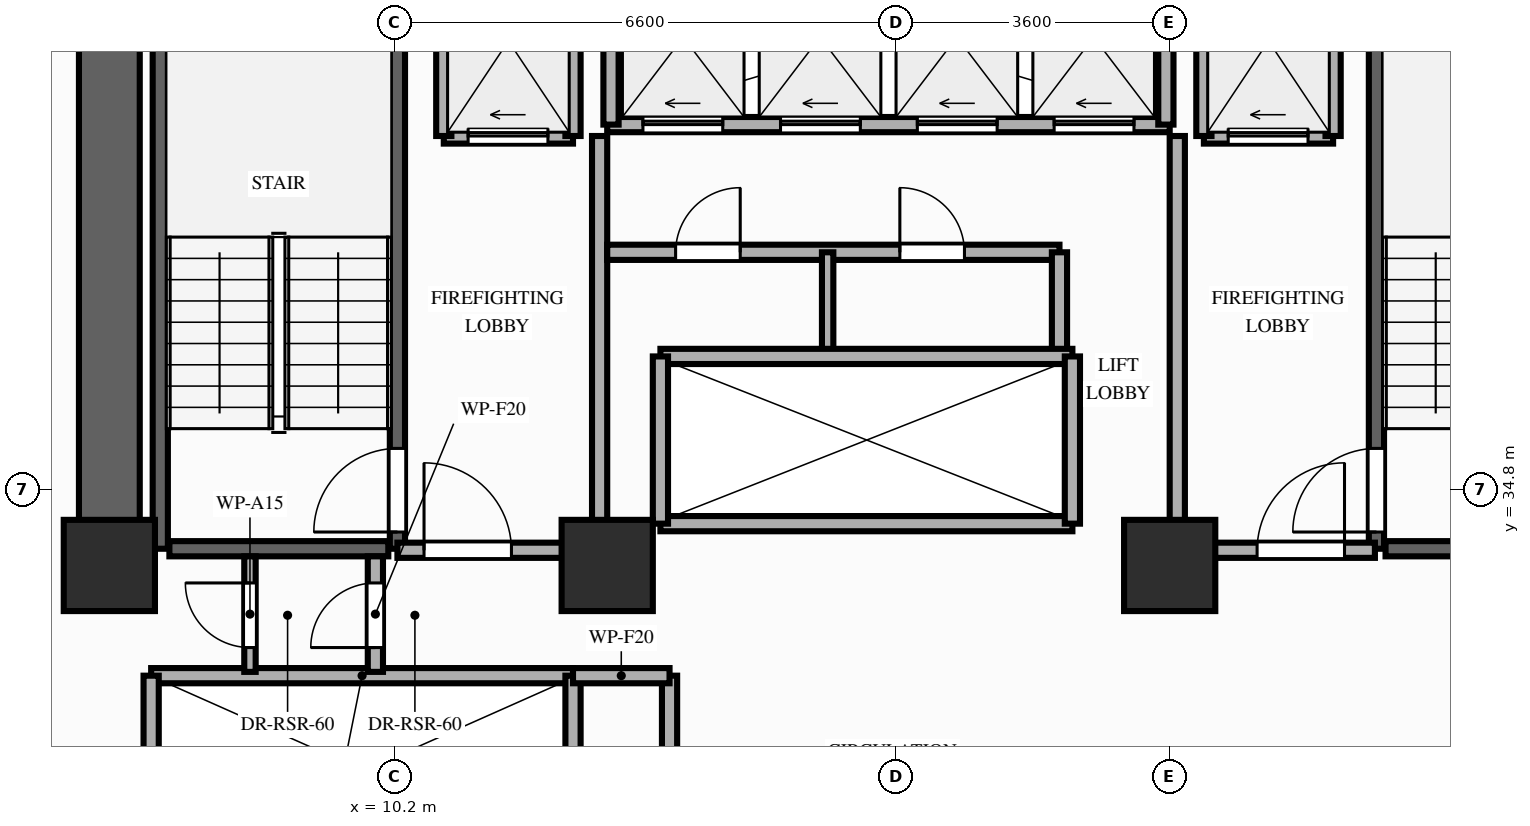
"""IFC4 building model, lengths in metres.
Left out: names, types, materials, properties, quantities, classifications, styles, units other than length and angle.
Written with IfcOpenShell. Run it as: python <this file> out.ifc"""

import sys

from ifc_helpers import new_model, si_unit, direction, frame, frame_2d, origin, origin_2d, place, context, subcontext, project, spatial, rectangle, extrude, element, fill, save


model = new_model("IFC4")
c1 = context("Model", 3, precision=1e-05, world=origin(), true_north=direction((0.0, 1.0)))
c2 = subcontext(c1, "Body", "Model", "MODEL_VIEW")
j1 = project(units=[si_unit("LENGTHUNIT", "METRE"), si_unit("PLANEANGLEUNIT", "RADIAN")], contexts=[c1])
p1 = place(None, origin())
s1 = spatial("IfcSite", under=j1, at=p1, CompositionType="ELEMENT")
p2 = place(p1, origin())
s2 = spatial("IfcBuilding", under=s1, at=p2, CompositionType="ELEMENT")
p3 = place(p2, frame((0.0, 0.0, 62.8)))
s3 = spatial("IfcBuildingStorey", under=s2, at=p3, CompositionType="ELEMENT", Elevation=62.8)
for number, where, z_axis, x_axis in (
    (1, (6.45, 33.8, 0.0), (0.0, 0.0, 1.0), (1.0, 0.0, 0.0)),
    (2, (13.0, 33.8, 0.0), (0.0, 0.0, 1.0), (1.0, 0.0, 0.0)),
    (3, (20.4, 33.8, 0.0), (0.0, 0.0, 1.0), (1.0, 0.0, 0.0)),
):
    element("IfcColumn", number, at=place(p3, frame(where, z_axis=z_axis, x_axis=x_axis)), inside=s3, PredefinedType="COLUMN", context=c2, shape_type="SweptSolid", body=[
        extrude(rectangle(XDim=1.2, YDim=1.2, at=origin_2d()), origin(), (0.0, 0.0, 1.0), 3.2),
    ])
p4 = place(p3, frame((6.45, 33.8, 0.0), z_axis=(0.0, 0.0, 1.0), x_axis=(0.0, 1.0, 0.0)))
e4 = element("IfcWall", 4, at=p4, inside=s3, PredefinedType="SHEAR", context=c2, shape_type="SweptSolid", body=[
    extrude(rectangle(XDim=7.95, YDim=0.8, at=frame_2d((3.975, 0.0))), origin(), (0.0, 0.0, 1.0), 3.02),
])
p5 = place(p3, frame((7.12, 34.02, 0.0), z_axis=(0.0, 0.0, 1.0), x_axis=(0.0, 1.0, 0.0)))
e5 = element("IfcWall", 5, at=p5, inside=s3, PredefinedType="SHEAR", context=c2, shape_type="SweptSolid", body=[
    extrude(rectangle(XDim=7.78, YDim=0.2, at=frame_2d((3.89, 0.0))), origin(), (0.0, 0.0, 1.0), 3.02),
])
p6 = place(p3, frame((10.24, 34.02, 0.0), z_axis=(0.0, 0.0, 1.0), x_axis=(0.0, 1.0, 0.0)))
e6 = element("IfcWall", 6, at=p6, inside=s3, PredefinedType="SHEAR", context=c2, shape_type="SweptSolid", body=[
    extrude(rectangle(XDim=7.78, YDim=0.2, at=frame_2d((3.89, 0.0))), origin(), (0.0, 0.0, 1.0), 3.02),
])
p7 = place(p6, frame((0.22, 0.0, 0.0)))
e7 = element("IfcOpeningElement", 7, at=p7, cuts=e6, PredefinedType="OPENING", context=c2, shape_type="SweptSolid", body=[
    extrude(rectangle(XDim=1.1, YDim=2.15, at=frame_2d((0.55, 1.075))), frame((0.0, 0.11, 0.0), z_axis=(0.0, -1.0, 0.0), x_axis=(1.0, 0.0, 0.0)), (0.0, 0.0, 1.0), 0.22),
])
p8 = place(p3, frame((7.24, 34.02, 0.0), z_axis=(0.0, 0.0, 1.0), x_axis=(1.0, 0.0, 0.0)))
e8 = element("IfcWall", 8, at=p8, inside=s3, PredefinedType="SHEAR", context=c2, shape_type="SweptSolid", body=[
    extrude(rectangle(XDim=2.88, YDim=0.2, at=frame_2d((1.44, 0.0))), origin(), (0.0, 0.0, 1.0), 3.02),
])
p9 = place(p3, frame((23.12, 34.02, 0.0), z_axis=(0.0, 0.0, 1.0), x_axis=(0.0, 1.0, 0.0)))
e9 = element("IfcWall", 9, at=p9, inside=s3, PredefinedType="SHEAR", context=c2, shape_type="SweptSolid", body=[
    extrude(rectangle(XDim=7.78, YDim=0.2, at=frame_2d((3.89, 0.0))), origin(), (0.0, 0.0, 1.0), 3.02),
])
p10 = place(p9, frame((0.22, 0.0, 0.0)))
e10 = element("IfcOpeningElement", 10, at=p10, cuts=e9, PredefinedType="OPENING", context=c2, shape_type="SweptSolid", body=[
    extrude(rectangle(XDim=1.1, YDim=2.15, at=frame_2d((0.55, 1.075))), frame((0.0, 0.11, 0.0), z_axis=(0.0, -1.0, 0.0), x_axis=(1.0, 0.0, 0.0)), (0.0, 0.0, 1.0), 0.22),
])
p11 = place(p3, frame((23.24, 34.02, 0.0), z_axis=(0.0, 0.0, 1.0), x_axis=(1.0, 0.0, 0.0)))
e11 = element("IfcWall", 11, at=p11, inside=s3, PredefinedType="SHEAR", context=c2, shape_type="SweptSolid", body=[
    extrude(rectangle(XDim=2.88, YDim=0.2, at=frame_2d((1.44, 0.0))), origin(), (0.0, 0.0, 1.0), 3.02),
])
p12 = place(p3, frame((7.0, 32.35, 0.0), z_axis=(0.0, 0.0, 1.0), x_axis=(1.0, 0.0, 0.0)))
e12 = element("IfcWall", 12, at=p12, inside=s3, PredefinedType="MOVABLE", context=c2, shape_type="SweptSolid", body=[
    extrude(rectangle(XDim=5.55, YDim=0.2, at=frame_2d((2.775, 0.0))), origin(), (0.0, 0.0, 1.0), 3.02),
])
for number, where, z_axis, x_axis in (
    (13, (7.0, 29.85, 0.0), (0.0, 0.0, 1.0), (0.0, 1.0, 0.0)),
    (14, (12.55, 29.85, 0.0), (0.0, 0.0, 1.0), (0.0, 1.0, 0.0)),
):
    element("IfcWall", number, at=place(p3, frame(where, z_axis=z_axis, x_axis=x_axis)), inside=s3, PredefinedType="MOVABLE", context=c2, shape_type="SweptSolid", body=[
        extrude(rectangle(XDim=2.5, YDim=0.2, at=frame_2d((1.25, 0.0))), origin(), (0.0, 0.0, 1.0), 3.02),
    ])
p13 = place(p3, frame((10.85, 39.45, 0.0), z_axis=(0.0, 0.0, 1.0), x_axis=(1.0, 0.0, 0.0)))
e15 = element("IfcWall", 15, at=p13, inside=s3, PredefinedType="MOVABLE", context=c2, shape_type="SweptSolid", body=[
    extrude(rectangle(XDim=1.7, YDim=0.2, at=frame_2d((0.85, 0.0))), origin(), (0.0, 0.0, 1.0), 3.02),
])
p14 = place(p13, frame((0.32, 0.0, 0.0)))
e16 = element("IfcOpeningElement", 16, at=p14, cuts=e15, PredefinedType="OPENING", context=c2, shape_type="SweptSolid", body=[
    extrude(rectangle(XDim=1.05, YDim=2.15, at=frame_2d((0.525, 1.075))), frame((0.0, 0.11, 0.0), z_axis=(0.0, -1.0, 0.0), x_axis=(1.0, 0.0, 0.0)), (0.0, 0.0, 1.0), 0.22),
])
p15 = place(p3, frame((20.85, 39.45, 0.0), z_axis=(0.0, 0.0, 1.0), x_axis=(1.0, 0.0, 0.0)))
e17 = element("IfcWall", 17, at=p15, inside=s3, PredefinedType="MOVABLE", context=c2, shape_type="SweptSolid", body=[
    extrude(rectangle(XDim=1.7, YDim=0.2, at=frame_2d((0.85, 0.0))), origin(), (0.0, 0.0, 1.0), 3.02),
])
p16 = place(p15, frame((0.32, 0.0, 0.0)))
e18 = element("IfcOpeningElement", 18, at=p16, cuts=e17, PredefinedType="OPENING", context=c2, shape_type="SweptSolid", body=[
    extrude(rectangle(XDim=1.05, YDim=2.15, at=frame_2d((0.525, 1.075))), frame((0.0, 0.11, 0.0), z_axis=(0.0, -1.0, 0.0), x_axis=(1.0, 0.0, 0.0)), (0.0, 0.0, 1.0), 0.22),
])
for number, where, z_axis, x_axis in (
    (19, (10.85, 39.45, 0.0), (0.0, 0.0, 1.0), (0.0, 1.0, 0.0)),
    (20, (12.55, 39.45, 0.0), (0.0, 0.0, 1.0), (0.0, 1.0, 0.0)),
):
    element("IfcWall", number, at=place(p3, frame(where, z_axis=z_axis, x_axis=x_axis)), inside=s3, PredefinedType="MOVABLE", context=c2, shape_type="SweptSolid", body=[
        extrude(rectangle(XDim=2.65, YDim=0.2, at=frame_2d((1.325, 0.0))), origin(), (0.0, 0.0, 1.0), 2.4),
    ])
p17 = place(p3, frame((12.9, 34.0, 0.0), z_axis=(0.0, 0.0, 1.0), x_axis=(0.0, 1.0, 0.0)))
e21 = element("IfcWall", 21, at=p17, inside=s3, PredefinedType="PARTITIONING", context=c2, shape_type="SweptSolid", body=[
    extrude(rectangle(XDim=5.45, YDim=0.2, at=frame_2d((2.725, 0.0))), origin(), (0.0, 0.0, 1.0), 2.4),
])
p18 = place(p3, frame((10.24, 34.0, 0.0), z_axis=(0.0, 0.0, 1.0), x_axis=(1.0, 0.0, 0.0)))
e22 = element("IfcWall", 22, at=p18, inside=s3, PredefinedType="PARTITIONING", context=c2, shape_type="SweptSolid", body=[
    extrude(rectangle(XDim=2.66, YDim=0.2, at=frame_2d((1.33, 0.0))), origin(), (0.0, 0.0, 1.0), 2.4),
])
p19 = place(p18, frame((0.35, 0.0, 0.0)))
e23 = element("IfcOpeningElement", 23, at=p19, cuts=e22, PredefinedType="OPENING", context=c2, shape_type="SweptSolid", body=[
    extrude(rectangle(XDim=1.15, YDim=2.15, at=frame_2d((0.575, 1.075))), frame((0.0, 0.11, 0.0), z_axis=(0.0, -1.0, 0.0), x_axis=(1.0, 0.0, 0.0)), (0.0, 0.0, 1.0), 0.22),
])
for number, where, z_axis, x_axis in (
    (24, (20.85, 39.45, 0.0), (0.0, 0.0, 1.0), (0.0, 1.0, 0.0)),
    (25, (22.55, 39.45, 0.0), (0.0, 0.0, 1.0), (0.0, 1.0, 0.0)),
):
    element("IfcWall", number, at=place(p3, frame(where, z_axis=z_axis, x_axis=x_axis)), inside=s3, PredefinedType="MOVABLE", context=c2, shape_type="SweptSolid", body=[
        extrude(rectangle(XDim=2.65, YDim=0.2, at=frame_2d((1.325, 0.0))), origin(), (0.0, 0.0, 1.0), 2.4),
    ])
p20 = place(p3, frame((20.5, 34.0, 0.0), z_axis=(0.0, 0.0, 1.0), x_axis=(0.0, 1.0, 0.0)))
e26 = element("IfcWall", 26, at=p20, inside=s3, PredefinedType="PARTITIONING", context=c2, shape_type="SweptSolid", body=[
    extrude(rectangle(XDim=5.45, YDim=0.2, at=frame_2d((2.725, 0.0))), origin(), (0.0, 0.0, 1.0), 2.4),
])
p21 = place(p3, frame((20.5, 34.0, 0.0), z_axis=(0.0, 0.0, 1.0), x_axis=(1.0, 0.0, 0.0)))
e27 = element("IfcWall", 27, at=p21, inside=s3, PredefinedType="PARTITIONING", context=c2, shape_type="SweptSolid", body=[
    extrude(rectangle(XDim=2.6, YDim=0.2, at=frame_2d((1.3, 0.0))), origin(), (0.0, 0.0, 1.0), 2.4),
])
p22 = place(p21, frame((1.05, 0.0, 0.0)))
e28 = element("IfcOpeningElement", 28, at=p22, cuts=e27, PredefinedType="OPENING", context=c2, shape_type="SweptSolid", body=[
    extrude(rectangle(XDim=1.15, YDim=2.15, at=frame_2d((0.575, 1.075))), frame((0.0, 0.11, 0.0), z_axis=(0.0, -1.0, 0.0), x_axis=(1.0, 0.0, 0.0)), (0.0, 0.0, 1.0), 0.22),
])
p23 = place(p3, frame((9.95, 32.4, 0.0), z_axis=(0.0, 0.0, 1.0), x_axis=(0.0, 1.0, 0.0)))
e29 = element("IfcWall", 29, at=p23, inside=s3, PredefinedType="PARTITIONING", context=c2, shape_type="SweptSolid", body=[
    extrude(rectangle(XDim=1.52, YDim=0.2, at=frame_2d((0.76, 0.0))), origin(), (0.0, 0.0, 1.0), 2.4),
])
p24 = place(p23, frame((0.32, 0.0, 0.0)))
e30 = element("IfcOpeningElement", 30, at=p24, cuts=e29, PredefinedType="OPENING", context=c2, shape_type="SweptSolid", body=[
    extrude(rectangle(XDim=0.85, YDim=2.05, at=frame_2d((0.425, 1.025))), frame((0.0, 0.11, 0.0), z_axis=(0.0, -1.0, 0.0), x_axis=(1.0, 0.0, 0.0)), (0.0, 0.0, 1.0), 0.22),
])
p25 = place(p3, frame((8.3, 32.4, 0.0), z_axis=(0.0, 0.0, 1.0), x_axis=(0.0, 1.0, 0.0)))
e31 = element("IfcWall", 31, at=p25, inside=s3, PredefinedType="PARTITIONING", context=c2, shape_type="SweptSolid", body=[
    extrude(rectangle(XDim=1.52, YDim=0.15, at=frame_2d((0.76, 0.0))), origin(), (0.0, 0.0, 1.0), 2.4),
])
p26 = place(p25, frame((0.32, 0.0, 0.0)))
e32 = element("IfcOpeningElement", 32, at=p26, cuts=e31, PredefinedType="OPENING", context=c2, shape_type="SweptSolid", body=[
    extrude(rectangle(XDim=0.85, YDim=2.05, at=frame_2d((0.425, 1.025))), frame((0.0, 0.085, 0.0), z_axis=(0.0, -1.0, 0.0), x_axis=(1.0, 0.0, 0.0)), (0.0, 0.0, 1.0), 0.17),
])
p27 = place(p3, frame((13.82, 29.85, 0.0), z_axis=(0.0, 0.0, 1.0), x_axis=(0.0, 1.0, 0.0)))
e33 = element("IfcWall", 33, at=p27, inside=s3, PredefinedType="PARTITIONING", context=c2, shape_type="SweptSolid", body=[
    extrude(rectangle(XDim=2.5, YDim=0.2, at=frame_2d((1.25, 0.0))), origin(), (0.0, 0.0, 1.0), 3.02),
])
p28 = place(p3, frame((12.55, 32.35, 0.0), z_axis=(0.0, 0.0, 1.0), x_axis=(1.0, 0.0, 0.0)))
e34 = element("IfcWall", 34, at=p28, inside=s3, PredefinedType="PARTITIONING", context=c2, shape_type="SweptSolid", body=[
    extrude(rectangle(XDim=1.27, YDim=0.2, at=frame_2d((0.635, 0.0))), origin(), (0.0, 0.0, 1.0), 3.02),
])
p29 = place(p3, frame((13.0, 39.6, 0.0), z_axis=(0.0, 0.0, 1.0), x_axis=(1.0, 0.0, 0.0)))
e35 = element("IfcWall", 35, at=p29, inside=s3, PredefinedType="MOVABLE", context=c2, shape_type="SweptSolid", body=[
    extrude(rectangle(XDim=7.4, YDim=0.2, at=frame_2d((3.7, 0.0))), origin(), (0.0, 0.0, 1.0), 3.02),
])
p30 = place(p29, frame((0.47, 0.0, 0.0)))
e36 = element("IfcOpeningElement", 36, at=p30, cuts=e35, PredefinedType="OPENING", context=c2, shape_type="SweptSolid", body=[
    extrude(rectangle(XDim=1.05, YDim=2.15, at=frame_2d((0.525, 1.075))), frame((0.0, 0.11, 0.0), z_axis=(0.0, -1.0, 0.0), x_axis=(1.0, 0.0, 0.0)), (0.0, 0.0, 1.0), 0.22),
])
p31 = place(p29, frame((2.28, 0.0, 0.0)))
e37 = element("IfcOpeningElement", 37, at=p31, cuts=e35, PredefinedType="OPENING", context=c2, shape_type="SweptSolid", body=[
    extrude(rectangle(XDim=1.05, YDim=2.15, at=frame_2d((0.525, 1.075))), frame((0.0, 0.11, 0.0), z_axis=(0.0, -1.0, 0.0), x_axis=(1.0, 0.0, 0.0)), (0.0, 0.0, 1.0), 0.22),
])
p32 = place(p29, frame((4.08, 0.0, 0.0)))
e38 = element("IfcOpeningElement", 38, at=p32, cuts=e35, PredefinedType="OPENING", context=c2, shape_type="SweptSolid", body=[
    extrude(rectangle(XDim=1.05, YDim=2.15, at=frame_2d((0.525, 1.075))), frame((0.0, 0.11, 0.0), z_axis=(0.0, -1.0, 0.0), x_axis=(1.0, 0.0, 0.0)), (0.0, 0.0, 1.0), 0.22),
])
p33 = place(p29, frame((5.88, 0.0, 0.0)))
e39 = element("IfcOpeningElement", 39, at=p33, cuts=e35, PredefinedType="OPENING", context=c2, shape_type="SweptSolid", body=[
    extrude(rectangle(XDim=1.05, YDim=2.15, at=frame_2d((0.525, 1.075))), frame((0.0, 0.11, 0.0), z_axis=(0.0, -1.0, 0.0), x_axis=(1.0, 0.0, 0.0)), (0.0, 0.0, 1.0), 0.22),
])
for number, where, z_axis, x_axis in (
    (40, (13.05, 39.6, 0.0), (0.0, 0.0, 1.0), (0.0, 1.0, 0.0)),
    (41, (20.35, 39.6, 0.0), (0.0, 0.0, 1.0), (0.0, 1.0, 0.0)),
):
    element("IfcWall", number, at=place(p3, frame(where, z_axis=z_axis, x_axis=x_axis)), inside=s3, PredefinedType="MOVABLE", context=c2, shape_type="SweptSolid", body=[
        extrude(rectangle(XDim=2.18, YDim=0.2, at=frame_2d((1.09, 0.0))), origin(), (0.0, 0.0, 1.0), 3.02),
    ])
p34 = place(p3, frame((13.0, 37.92, 0.0), z_axis=(0.0, 0.0, 1.0), x_axis=(1.0, 0.0, 0.0)))
e42 = element("IfcWall", 42, at=p34, inside=s3, PredefinedType="PARTITIONING", context=c2, shape_type="SweptSolid", body=[
    extrude(rectangle(XDim=5.95, YDim=0.2, at=frame_2d((2.975, 0.0))), origin(), (0.0, 0.0, 1.0), 3.02),
])
p35 = place(p34, frame((0.9, 0.0, 0.0)))
e43 = element("IfcOpeningElement", 43, at=p35, cuts=e42, PredefinedType="OPENING", context=c2, shape_type="SweptSolid", body=[
    extrude(rectangle(XDim=0.85, YDim=2.05, at=frame_2d((0.425, 1.025))), frame((0.0, 0.11, 0.0), z_axis=(0.0, -1.0, 0.0), x_axis=(1.0, 0.0, 0.0)), (0.0, 0.0, 1.0), 0.22),
])
p36 = place(p34, frame((3.85, 0.0, 0.0)))
e44 = element("IfcOpeningElement", 44, at=p36, cuts=e42, PredefinedType="OPENING", context=c2, shape_type="SweptSolid", body=[
    extrude(rectangle(XDim=0.85, YDim=2.05, at=frame_2d((0.425, 1.025))), frame((0.0, 0.11, 0.0), z_axis=(0.0, -1.0, 0.0), x_axis=(1.0, 0.0, 0.0)), (0.0, 0.0, 1.0), 0.22),
])
p37 = place(p3, frame((18.95, 36.6, 0.0), z_axis=(0.0, 0.0, 1.0), x_axis=(0.0, 1.0, 0.0)))
e45 = element("IfcWall", 45, at=p37, inside=s3, PredefinedType="PARTITIONING", context=c2, shape_type="SweptSolid", body=[
    extrude(rectangle(XDim=1.32, YDim=0.2, at=frame_2d((0.66, 0.0))), origin(), (0.0, 0.0, 1.0), 3.02),
])
p38 = place(p3, frame((15.9, 36.6, 0.0), z_axis=(0.0, 0.0, 1.0), x_axis=(0.0, 1.0, 0.0)))
e46 = element("IfcWall", 46, at=p38, inside=s3, PredefinedType="PARTITIONING", context=c2, shape_type="SweptSolid", body=[
    extrude(rectangle(XDim=1.32, YDim=0.15, at=frame_2d((0.66, 0.0))), origin(), (0.0, 0.0, 1.0), 3.02),
])
for number, where, z_axis, x_axis in (
    (47, (13.7, 34.35, 0.0), (0.0, 0.0, 1.0), (1.0, 0.0, 0.0)),
    (48, (13.7, 36.55, 0.0), (0.0, 0.0, 1.0), (1.0, 0.0, 0.0)),
):
    element("IfcWall", number, at=place(p3, frame(where, z_axis=z_axis, x_axis=x_axis)), inside=s3, PredefinedType="MOVABLE", context=c2, shape_type="SweptSolid", body=[
        extrude(rectangle(XDim=5.42, YDim=0.2, at=frame_2d((2.71, 0.0))), origin(), (0.0, 0.0, 1.0), 3.02),
    ])
for number, where, z_axis, x_axis in (
    (49, (13.7, 34.35, 0.0), (0.0, 0.0, 1.0), (0.0, 1.0, 0.0)),
    (50, (19.12, 34.35, 0.0), (0.0, 0.0, 1.0), (0.0, 1.0, 0.0)),
):
    element("IfcWall", number, at=place(p3, frame(where, z_axis=z_axis, x_axis=x_axis)), inside=s3, PredefinedType="MOVABLE", context=c2, shape_type="SweptSolid", body=[
        extrude(rectangle(XDim=2.2, YDim=0.2, at=frame_2d((1.1, 0.0))), origin(), (0.0, 0.0, 1.0), 3.02),
    ])
p39 = place(p7, origin())
e51 = element("IfcDoor", 51, at=p39, inside=s3, OperationType="SINGLE_SWING_LEFT", PredefinedType="DOOR", context=c2, shape_type="SweptSolid", body=[
    extrude(rectangle(XDim=1.1, YDim=2.15, at=frame_2d((0.55, 1.075))), frame((0.0, 0.025, 0.0), z_axis=(0.0, -1.0, 0.0), x_axis=(1.0, 0.0, 0.0)), (0.0, 0.0, 1.0), 0.05),
])
fill(e7, e51)
p40 = place(p10, origin())
e52 = element("IfcDoor", 52, at=p40, inside=s3, OperationType="SINGLE_SWING_LEFT", PredefinedType="DOOR", context=c2, shape_type="SweptSolid", body=[
    extrude(rectangle(XDim=1.1, YDim=2.15, at=frame_2d((0.55, 1.075))), frame((0.0, 0.025, 0.0), z_axis=(0.0, -1.0, 0.0), x_axis=(1.0, 0.0, 0.0)), (0.0, 0.0, 1.0), 0.05),
])
fill(e10, e52)
p41 = place(p14, origin())
e53 = element("IfcDoor", 53, at=p41, inside=s3, OperationType="SLIDING_TO_LEFT", PredefinedType="DOOR", context=c2, shape_type="SweptSolid", body=[
    extrude(rectangle(XDim=1.05, YDim=2.15, at=frame_2d((0.525, 1.075))), frame((0.0, 0.025, 0.0), z_axis=(0.0, -1.0, 0.0), x_axis=(1.0, 0.0, 0.0)), (0.0, 0.0, 1.0), 0.05),
])
fill(e16, e53)
p42 = place(p16, origin())
e54 = element("IfcDoor", 54, at=p42, inside=s3, OperationType="SLIDING_TO_LEFT", PredefinedType="DOOR", context=c2, shape_type="SweptSolid", body=[
    extrude(rectangle(XDim=1.05, YDim=2.15, at=frame_2d((0.525, 1.075))), frame((0.0, 0.025, 0.0), z_axis=(0.0, -1.0, 0.0), x_axis=(1.0, 0.0, 0.0)), (0.0, 0.0, 1.0), 0.05),
])
fill(e18, e54)
p43 = place(p19, origin())
e55 = element("IfcDoor", 55, at=p43, inside=s3, OperationType="SINGLE_SWING_LEFT", PredefinedType="DOOR", context=c2, shape_type="SweptSolid", body=[
    extrude(rectangle(XDim=1.15, YDim=2.15, at=frame_2d((0.575, 1.075))), frame((0.0, 0.025, 0.0), z_axis=(0.0, -1.0, 0.0), x_axis=(1.0, 0.0, 0.0)), (0.0, 0.0, 1.0), 0.05),
])
fill(e23, e55)
p44 = place(p22, origin())
e56 = element("IfcDoor", 56, at=p44, inside=s3, OperationType="SINGLE_SWING_RIGHT", PredefinedType="DOOR", context=c2, shape_type="SweptSolid", body=[
    extrude(rectangle(XDim=1.15, YDim=2.15, at=frame_2d((0.575, 1.075))), frame((0.0, 0.025, 0.0), z_axis=(0.0, -1.0, 0.0), x_axis=(1.0, 0.0, 0.0)), (0.0, 0.0, 1.0), 0.05),
])
fill(e28, e56)
p45 = place(p24, origin())
e57 = element("IfcDoor", 57, at=p45, inside=s3, OperationType="SINGLE_SWING_LEFT", PredefinedType="DOOR", context=c2, shape_type="SweptSolid", body=[
    extrude(rectangle(XDim=0.85, YDim=2.05, at=frame_2d((0.425, 1.025))), frame((0.0, 0.025, 0.0), z_axis=(0.0, -1.0, 0.0), x_axis=(1.0, 0.0, 0.0)), (0.0, 0.0, 1.0), 0.05),
])
fill(e30, e57)
p46 = place(p26, origin())
e58 = element("IfcDoor", 58, at=p46, inside=s3, OperationType="SINGLE_SWING_RIGHT", PredefinedType="DOOR", context=c2, shape_type="SweptSolid", body=[
    extrude(rectangle(XDim=0.85, YDim=2.05, at=frame_2d((0.425, 1.025))), frame((0.0, 0.025, 0.0), z_axis=(0.0, -1.0, 0.0), x_axis=(1.0, 0.0, 0.0)), (0.0, 0.0, 1.0), 0.05),
])
fill(e32, e58)
p47 = place(p30, origin())
e59 = element("IfcDoor", 59, at=p47, inside=s3, OperationType="SLIDING_TO_LEFT", PredefinedType="DOOR", context=c2, shape_type="SweptSolid", body=[
    extrude(rectangle(XDim=1.05, YDim=2.15, at=frame_2d((0.525, 1.075))), frame((0.0, 0.025, 0.0), z_axis=(0.0, -1.0, 0.0), x_axis=(1.0, 0.0, 0.0)), (0.0, 0.0, 1.0), 0.05),
])
fill(e36, e59)
p48 = place(p31, origin())
e60 = element("IfcDoor", 60, at=p48, inside=s3, OperationType="SLIDING_TO_LEFT", PredefinedType="DOOR", context=c2, shape_type="SweptSolid", body=[
    extrude(rectangle(XDim=1.05, YDim=2.15, at=frame_2d((0.525, 1.075))), frame((0.0, 0.025, 0.0), z_axis=(0.0, -1.0, 0.0), x_axis=(1.0, 0.0, 0.0)), (0.0, 0.0, 1.0), 0.05),
])
fill(e37, e60)
p49 = place(p32, origin())
e61 = element("IfcDoor", 61, at=p49, inside=s3, OperationType="SLIDING_TO_LEFT", PredefinedType="DOOR", context=c2, shape_type="SweptSolid", body=[
    extrude(rectangle(XDim=1.05, YDim=2.15, at=frame_2d((0.525, 1.075))), frame((0.0, 0.025, 0.0), z_axis=(0.0, -1.0, 0.0), x_axis=(1.0, 0.0, 0.0)), (0.0, 0.0, 1.0), 0.05),
])
fill(e38, e61)
p50 = place(p33, origin())
e62 = element("IfcDoor", 62, at=p50, inside=s3, OperationType="SLIDING_TO_LEFT", PredefinedType="DOOR", context=c2, shape_type="SweptSolid", body=[
    extrude(rectangle(XDim=1.05, YDim=2.15, at=frame_2d((0.525, 1.075))), frame((0.0, 0.025, 0.0), z_axis=(0.0, -1.0, 0.0), x_axis=(1.0, 0.0, 0.0)), (0.0, 0.0, 1.0), 0.05),
])
fill(e39, e62)
p51 = place(p35, origin())
e63 = element("IfcDoor", 63, at=p51, inside=s3, OperationType="SINGLE_SWING_RIGHT", PredefinedType="DOOR", context=c2, shape_type="SweptSolid", body=[
    extrude(rectangle(XDim=0.85, YDim=2.05, at=frame_2d((0.425, 1.025))), frame((0.0, 0.025, 0.0), z_axis=(0.0, -1.0, 0.0), x_axis=(1.0, 0.0, 0.0)), (0.0, 0.0, 1.0), 0.05),
])
fill(e43, e63)
p52 = place(p36, origin())
e64 = element("IfcDoor", 64, at=p52, inside=s3, OperationType="SINGLE_SWING_LEFT", PredefinedType="DOOR", context=c2, shape_type="SweptSolid", body=[
    extrude(rectangle(XDim=0.85, YDim=2.05, at=frame_2d((0.425, 1.025))), frame((0.0, 0.025, 0.0), z_axis=(0.0, -1.0, 0.0), x_axis=(1.0, 0.0, 0.0)), (0.0, 0.0, 1.0), 0.05),
])
fill(e44, e64)
save(model, sys.argv[1])
